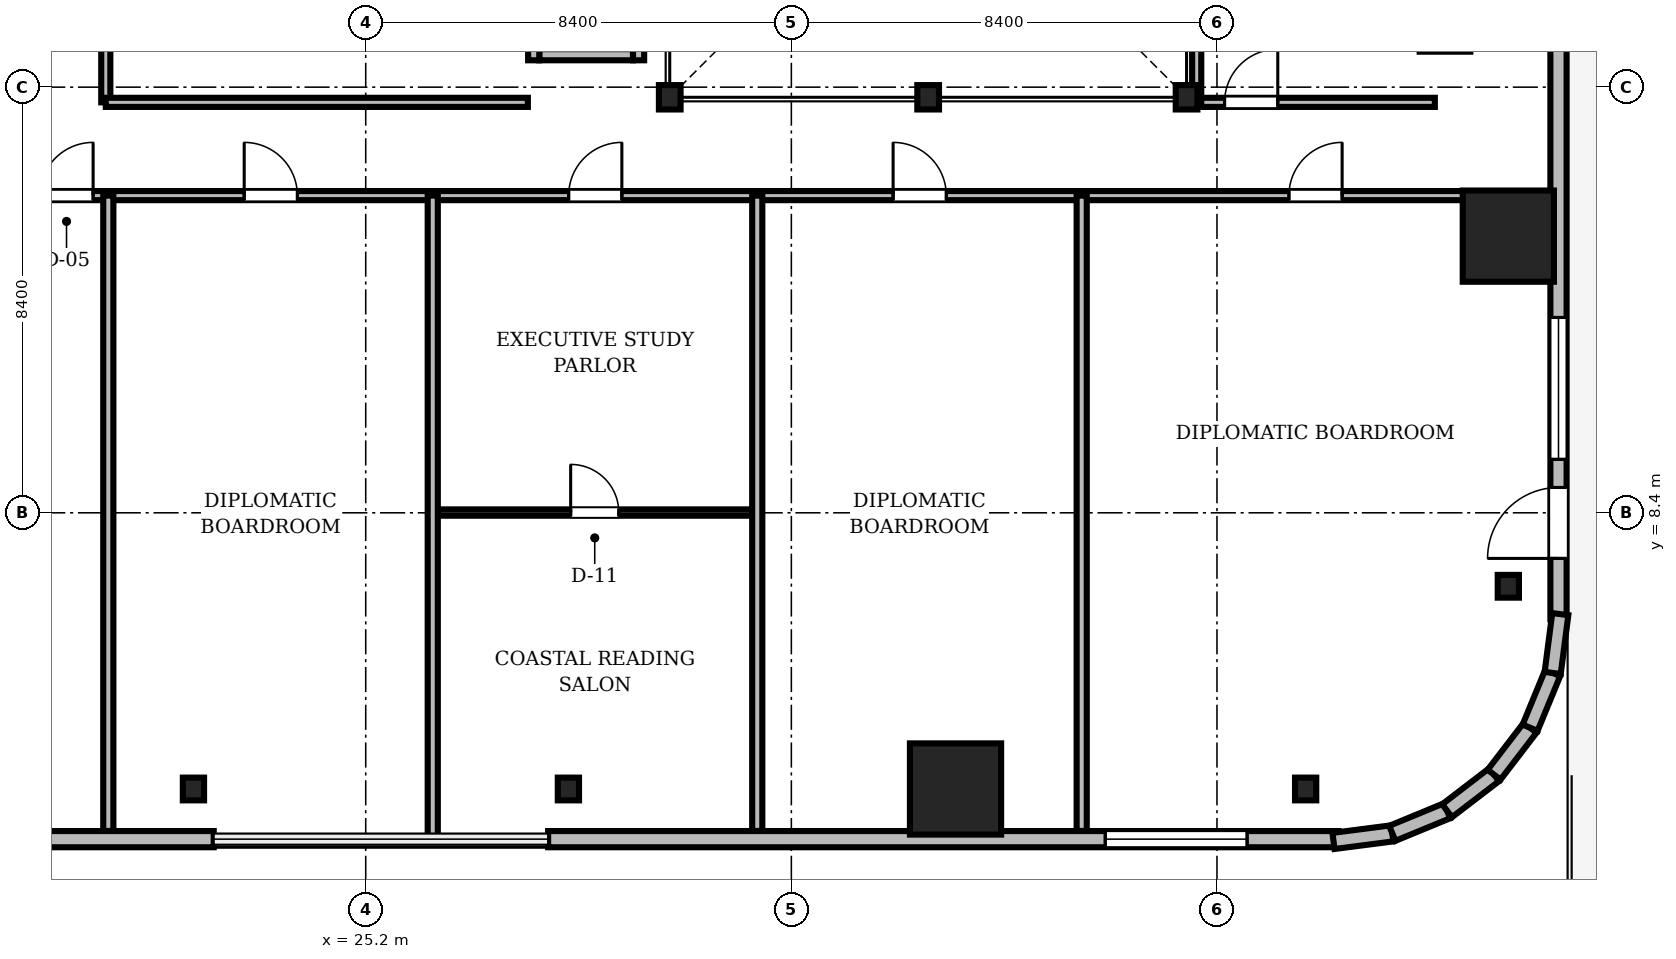
"""IFC4 building model, lengths in metres.
Left out: names, types, materials, properties, quantities, classifications, styles, units other than length and angle.
Written with IfcOpenShell. Run it as: python <this file> out.ifc"""

import sys

from ifc_helpers import new_model, si_unit, direction, frame, frame_2d, origin, origin_2d, place, context, subcontext, project, spatial, rectangle, i_section, extrude, source, transform, mapped, element, fill, save


model = new_model("IFC4")
c1 = context("Model", 3, precision=1e-05, world=origin(), true_north=direction((0.0, 1.0)))
c2 = subcontext(c1, "Body", "Model", "MODEL_VIEW")
j1 = project(units=[si_unit("LENGTHUNIT", "METRE"), si_unit("PLANEANGLEUNIT", "RADIAN")], contexts=[c1])
p1 = place(None, origin())
s1 = spatial("IfcSite", under=j1, at=p1, CompositionType="ELEMENT")
p2 = place(p1, origin())
s2 = spatial("IfcBuilding", under=s1, at=p2, CompositionType="ELEMENT")
p3 = place(p2, frame((0.0, 0.0, 27.6)))
s3 = spatial("IfcBuildingStorey", under=s2, at=p3, CompositionType="ELEMENT", Elevation=27.6)
m1 = source(origin(), c2, "Body", "SweptSolid", [
    extrude(i_section(OverallWidth=0.428, OverallDepth=0.481, WebThickness=0.04, FlangeThickness=0.063, FilletRadius=0.015, at=origin_2d()), origin(), (0.0, 0.0, 1.0), 3.41),
])
for number, where, z_axis, x_axis in (
    (1, (31.2, 16.6, 0.0), (0.0, 0.0, 1.0), (1.0, 0.0, 0.0)),
    (2, (36.3, 16.6, 0.0), (0.0, 0.0, 1.0), (1.0, 0.0, 0.0)),
    (3, (41.4, 16.6, 0.0), (0.0, 0.0, 1.0), (1.0, 0.0, 0.0)),
):
    element("IfcColumn", number, at=place(p3, frame(where, z_axis=z_axis, x_axis=x_axis)), inside=s3, PredefinedType="COLUMN", context=c2, shape_type="MappedRepresentation", body=[
        mapped(m1, transform((0.0, 0.0, 0.0), scale=1.0)),
    ])
m2 = source(origin(), c2, "Body", "SweptSolid", [
    extrude(rectangle(XDim=1.8, YDim=1.8, at=origin_2d()), origin(), (0.0, 0.0, 1.0), 3.41),
])
for number, where, z_axis, x_axis in (
    (4, (36.84, 2.95, 0.0), (0.0, 0.0, 1.0), (1.0, 0.0, 0.0)),
    (5, (47.75, 13.86, 0.0), (0.0, 0.0, 1.0), (1.0, 0.0, 0.0)),
):
    element("IfcColumn", number, at=place(p3, frame(where, z_axis=z_axis, x_axis=x_axis)), inside=s3, PredefinedType="COLUMN", context=c2, shape_type="MappedRepresentation", body=[
        mapped(m2, transform((0.0, 0.0, 0.0), scale=1.0)),
    ])
m3 = source(origin(), c2, "Body", "SweptSolid", [
    extrude(i_section(OverallWidth=0.419, OverallDepth=0.449, WebThickness=0.031, FlangeThickness=0.048, FilletRadius=0.015, at=origin_2d()), origin(), (0.0, 0.0, 1.0), 3.41),
])
for number, where, z_axis, x_axis in (
    (6, (21.8, 2.95, 0.0), (0.0, 0.0, 1.0), (1.0, 0.0, 0.0)),
    (7, (29.2, 2.95, 0.0), (0.0, 0.0, 1.0), (1.0, 0.0, 0.0)),
    (8, (43.75, 2.95, 0.0), (0.0, 0.0, 1.0), (1.0, 0.0, 0.0)),
    (9, (47.75, 6.95, 0.0), (0.0, 0.0, 1.0), (1.0, 0.0, 0.0)),
):
    element("IfcColumn", number, at=place(p3, frame(where, z_axis=z_axis, x_axis=x_axis)), inside=s3, PredefinedType="COLUMN", context=c2, shape_type="MappedRepresentation", body=[
        mapped(m3, transform((0.0, 0.0, 0.0), scale=1.0)),
    ])
m4 = source(origin(), c2, "Body", "SweptSolid", [
    extrude(rectangle(XDim=15.6, YDim=0.32, at=frame_2d((7.8, 0.0))), origin(), (0.0, 0.0, 1.0), 3.41),
])
p4 = place(p3, frame((6.6, 1.96, 0.0), z_axis=(0.0, 0.0, 1.0), x_axis=(1.0, 0.0, 0.0)))
e10 = element("IfcWall", 10, at=p4, inside=s3, PredefinedType="SOLIDWALL", context=c2, shape_type="MappedRepresentation", body=[
    mapped(m4, transform((0.0, 0.0, 0.0), scale=1.0)),
])
m5 = source(origin(), c2, "Body", "SweptSolid", [
    extrude(rectangle(XDim=1.4, YDim=2.3, at=frame_2d((0.7, 1.15))), frame((0.0, 0.17, 0.0), z_axis=(0.0, -1.0, 0.0), x_axis=(1.0, 0.0, 0.0)), (0.0, 0.0, 1.0), 0.34),
])
p5 = place(p4, frame((9.61, 0.0, 0.0)))
e11 = element("IfcOpeningElement", 11, at=p5, cuts=e10, PredefinedType="OPENING", context=c2, shape_type="MappedRepresentation", body=[
    mapped(m5, transform((0.0, 0.0, 0.0), scale=1.0)),
])
m6 = source(origin(), c2, "Body", "SweptSolid", [
    extrude(rectangle(XDim=2.8, YDim=2.4, at=frame_2d((1.4, 1.2))), frame((0.0, 0.17, 0.0), z_axis=(0.0, -1.0, 0.0), x_axis=(1.0, 0.0, 0.0)), (0.0, 0.0, 1.0), 0.34),
])
p6 = place(p4, frame((2.705, 0.0, 0.72)))
e12 = element("IfcOpeningElement", 12, at=p6, cuts=e10, PredefinedType="OPENING", context=c2, shape_type="MappedRepresentation", body=[
    mapped(m6, transform((0.0, 0.0, 0.0), scale=1.0)),
])
p7 = place(p3, frame((28.8, 1.96, 0.0), z_axis=(0.0, 0.0, 1.0), x_axis=(1.0, 0.0, 0.0)))
e13 = element("IfcWall", 13, at=p7, inside=s3, PredefinedType="SOLIDWALL", context=c2, shape_type="MappedRepresentation", body=[
    mapped(m4, transform((0.0, 0.0, 0.0), scale=1.0)),
])
p8 = place(p7, frame((10.995, 0.0, 0.72)))
e14 = element("IfcOpeningElement", 14, at=p8, cuts=e13, PredefinedType="OPENING", context=c2, shape_type="MappedRepresentation", body=[
    mapped(m6, transform((0.0, 0.0, 0.0), scale=1.0)),
])
p9 = place(p3, frame((48.74, 6.3, 0.0), z_axis=(0.0, 0.0, 1.0), x_axis=(0.0, 1.0, 0.0)))
e15 = element("IfcWall", 15, at=p9, inside=s3, PredefinedType="SOLIDWALL", context=c2, shape_type="MappedRepresentation", body=[
    mapped(m4, transform((0.0, 0.0, 0.0), scale=1.0)),
])
p10 = place(p9, frame((1.2, 0.0, 0.0)))
e16 = element("IfcOpeningElement", 16, at=p10, cuts=e15, PredefinedType="OPENING", context=c2, shape_type="MappedRepresentation", body=[
    mapped(m5, transform((0.0, 0.0, 0.0), scale=1.0)),
])
p11 = place(p9, frame((3.155, 0.0, 0.72)))
e17 = element("IfcOpeningElement", 17, at=p11, cuts=e15, PredefinedType="OPENING", context=c2, shape_type="MappedRepresentation", body=[
    mapped(m6, transform((0.0, 0.0, 0.0), scale=1.0)),
])
m7 = source(origin(), c2, "Body", "SweptSolid", [
    extrude(rectangle(XDim=1.17, YDim=0.32, at=frame_2d((0.585, 0.0))), origin(), (0.0, 0.0, 1.0), 3.41),
])
p12 = place(p3, frame((44.3, 1.925, 0.0), z_axis=(0.0, 0.0, 1.0), x_axis=(0.991762485493, 0.128090485085, 0.0)))
e18 = element("IfcWall", 18, at=p12, inside=s3, PredefinedType="SOLIDWALL", context=c2, shape_type="MappedRepresentation", body=[
    mapped(m7, transform((0.0, 0.0, 0.0), scale=1.0)),
])
m8 = source(origin(), c2, "Body", "SweptSolid", [
    extrude(rectangle(XDim=1.169, YDim=0.32, at=frame_2d((0.585, 0.0))), origin(), (0.0, 0.0, 1.0), 3.41),
])
p13 = place(p3, frame((45.46, 2.074, 0.0), z_axis=(0.0, 0.0, 1.0), x_axis=(0.924479075121, 0.381232789334, 0.0)))
e19 = element("IfcWall", 19, at=p13, inside=s3, PredefinedType="SOLIDWALL", context=c2, shape_type="MappedRepresentation", body=[
    mapped(m8, transform((0.0, 0.0, 0.0), scale=1.0)),
])
m9 = source(origin(), c2, "Body", "SweptSolid", [
    extrude(rectangle(XDim=1.169, YDim=0.32, at=frame_2d((0.584, 0.0))), origin(), (0.0, 0.0, 1.0), 3.41),
])
p14 = place(p3, frame((46.541, 2.52, 0.0), z_axis=(0.0, 0.0, 1.0), x_axis=(0.793663520347, 0.608356981114, 0.0)))
e20 = element("IfcWall", 20, at=p14, inside=s3, PredefinedType="SOLIDWALL", context=c2, shape_type="MappedRepresentation", body=[
    mapped(m9, transform((0.0, 0.0, 0.0), scale=1.0)),
])
m10 = source(origin(), c2, "Body", "SweptSolid", [
    extrude(rectangle(XDim=1.169, YDim=0.32, at=frame_2d((0.584, 0.0))), origin(), (0.0, 0.0, 1.0), 3.41),
])
for number, where, z_axis, x_axis in (
    (21, (47.469, 3.231, 0.0), (0.0, 0.0, 1.0), (0.608, 0.794, 0.0)),
    (22, (48.18, 4.159, 0.0), (0.0, 0.0, 1.0), (0.381, 0.925, 0.0)),
):
    element("IfcWall", number, at=place(p3, frame(where, z_axis=z_axis, x_axis=x_axis)), inside=s3, PredefinedType="SOLIDWALL", context=c2, shape_type="MappedRepresentation", body=[
        mapped(m10, transform((0.0, 0.0, 0.0), scale=1.0)),
    ])
m11 = source(origin(), c2, "Body", "SweptSolid", [
    extrude(rectangle(XDim=1.171, YDim=0.32, at=frame_2d((0.585, 0.0))), origin(), (0.0, 0.0, 1.0), 3.41),
])
p15 = place(p3, frame((48.625, 5.24, 0.0), z_axis=(0.0, 0.0, 1.0), x_axis=(0.128269133229, 0.991739395941, 0.0)))
e23 = element("IfcWall", 23, at=p15, inside=s3, PredefinedType="SOLIDWALL", context=c2, shape_type="MappedRepresentation", body=[
    mapped(m11, transform((0.0, 0.0, 0.0), scale=1.0)),
])
m12 = source(origin(), c2, "Body", "SweptSolid", [
    extrude(rectangle(XDim=1.85, YDim=0.22, at=frame_2d((0.925, 0.0))), origin(), (0.0, 0.0, 1.0), 3.41),
])
p16 = place(p3, frame((28.625, 17.44, 0.0), z_axis=(0.0, 0.0, 1.0), x_axis=(1.0, 0.0, 0.0)))
e24 = element("IfcWall", 24, at=p16, inside=s3, PredefinedType="SOLIDWALL", context=c2, shape_type="MappedRepresentation", body=[
    mapped(m12, transform((0.0, 0.0, 0.0), scale=1.0)),
])
m13 = source(origin(), c2, "Body", "SweptSolid", [
    extrude(rectangle(XDim=2.54, YDim=0.22, at=frame_2d((1.27, 0.0))), origin(), (0.0, 0.0, 1.0), 3.41),
])
for number, where, z_axis, x_axis in (
    (25, (28.515, 17.33, 0.0), (0.0, 0.0, 1.0), (0.0, 1.0, 0.0)),
    (26, (30.585, 17.33, 0.0), (0.0, 0.0, 1.0), (0.0, 1.0, 0.0)),
):
    element("IfcWall", number, at=place(p3, frame(where, z_axis=z_axis, x_axis=x_axis)), inside=s3, PredefinedType="SOLIDWALL", context=c2, shape_type="MappedRepresentation", body=[
        mapped(m13, transform((0.0, 0.0, 0.0), scale=1.0)),
    ])
m14 = source(origin(), c2, "Body", "SweptSolid", [
    extrude(rectangle(XDim=46.156, YDim=0.18, at=frame_2d((23.078, 0.0))), origin(), (0.0, 0.0, 1.0), 2.652),
])
p17 = place(p3, frame((2.422, 14.66, 0.0), z_axis=(0.0, 0.0, 1.0), x_axis=(1.0, 0.0, 0.0)))
e27 = element("IfcWall", 27, at=p17, inside=s3, PredefinedType="PARTITIONING", context=c2, shape_type="MappedRepresentation", body=[
    mapped(m14, transform((0.0, 0.0, 0.0), scale=1.0)),
])
m15 = source(origin(), c2, "Body", "SweptSolid", [
    extrude(rectangle(XDim=1.05, YDim=2.2, at=frame_2d((0.525, 1.1))), frame((0.0, 0.1, 0.0), z_axis=(0.0, -1.0, 0.0), x_axis=(1.0, 0.0, 0.0)), (0.0, 0.0, 1.0), 0.2),
])
p18 = place(p17, frame((16.348, 0.0, 0.0)))
e28 = element("IfcOpeningElement", 28, at=p18, cuts=e27, PredefinedType="OPENING", context=c2, shape_type="MappedRepresentation", body=[
    mapped(m15, transform((0.0, 0.0, 0.0), scale=1.0)),
])
p19 = place(p17, frame((20.38, 0.0, 0.0)))
e29 = element("IfcOpeningElement", 29, at=p19, cuts=e27, PredefinedType="OPENING", context=c2, shape_type="MappedRepresentation", body=[
    mapped(m15, transform((0.0, 0.0, 0.0), scale=1.0)),
])
p20 = place(p17, frame((26.783, 0.0, 0.0)))
e30 = element("IfcOpeningElement", 30, at=p20, cuts=e27, PredefinedType="OPENING", context=c2, shape_type="MappedRepresentation", body=[
    mapped(m15, transform((0.0, 0.0, 0.0), scale=1.0)),
])
p21 = place(p17, frame((33.186, 0.0, 0.0)))
e31 = element("IfcOpeningElement", 31, at=p21, cuts=e27, PredefinedType="OPENING", context=c2, shape_type="MappedRepresentation", body=[
    mapped(m15, transform((0.0, 0.0, 0.0), scale=1.0)),
])
p22 = place(p17, frame((40.998, 0.0, 0.0)))
e32 = element("IfcOpeningElement", 32, at=p22, cuts=e27, PredefinedType="OPENING", context=c2, shape_type="MappedRepresentation", body=[
    mapped(m15, transform((0.0, 0.0, 0.0), scale=1.0)),
])
m16 = source(origin(), c2, "Body", "SweptSolid", [
    extrude(rectangle(XDim=11.94, YDim=0.18, at=frame_2d((5.97, 0.0))), origin(), (0.0, 0.0, 1.0), 2.802),
])
p23 = place(p3, frame((20.07, 16.5, 0.0), z_axis=(0.0, 0.0, 1.0), x_axis=(0.0, 1.0, 0.0)))
e33 = element("IfcWall", 33, at=p23, inside=s3, PredefinedType="PARTITIONING", context=c2, shape_type="MappedRepresentation", body=[
    mapped(m16, transform((0.0, 0.0, 0.0), scale=1.0)),
])
p24 = place(p23, frame((4.5, 0.0, 0.0)))
e34 = element("IfcOpeningElement", 34, at=p24, cuts=e33, PredefinedType="OPENING", context=c2, shape_type="MappedRepresentation", body=[
    mapped(m15, transform((0.0, 0.0, 0.0), scale=1.0)),
])
m17 = source(origin(), c2, "Body", "SweptSolid", [
    extrude(rectangle(XDim=6.404, YDim=0.125, at=frame_2d((3.202, 0.0))), origin(), (0.0, 0.0, 1.0), 2.802),
])
p25 = place(p3, frame((26.523, 8.405, 0.0), z_axis=(0.0, 0.0, 1.0), x_axis=(1.0, 0.0, 0.0)))
e35 = element("IfcWall", 35, at=p25, inside=s3, PredefinedType="PARTITIONING", context=c2, shape_type="MappedRepresentation", body=[
    mapped(m17, transform((0.0, 0.0, 0.0), scale=1.0)),
])
m18 = source(origin(), c2, "Body", "SweptSolid", [
    extrude(rectangle(XDim=0.95, YDim=2.15, at=frame_2d((0.475, 1.075))), frame((0.0, 0.073, 0.0), z_axis=(0.0, -1.0, 0.0), x_axis=(1.0, 0.0, 0.0)), (0.0, 0.0, 1.0), 0.145),
])
p26 = place(p25, frame((2.722, 0.0, 0.0)))
e36 = element("IfcOpeningElement", 36, at=p26, cuts=e35, PredefinedType="OPENING", context=c2, shape_type="MappedRepresentation", body=[
    mapped(m18, transform((0.0, 0.0, 0.0), scale=1.0)),
])
m19 = source(origin(), c2, "Body", "SweptSolid", [
    extrude(rectangle(XDim=4.7, YDim=0.18, at=frame_2d((2.35, 0.0))), origin(), (0.0, 0.0, 1.0), 2.802),
])
p27 = place(p3, frame((41.6, 16.5, 0.0), z_axis=(0.0, 0.0, 1.0), x_axis=(1.0, 0.0, 0.0)))
e37 = element("IfcWall", 37, at=p27, inside=s3, PredefinedType="PARTITIONING", context=c2, shape_type="MappedRepresentation", body=[
    mapped(m19, transform((0.0, 0.0, 0.0), scale=1.0)),
])
p28 = place(p27, frame((0.55, 0.0, 0.0)))
e38 = element("IfcOpeningElement", 38, at=p28, cuts=e37, PredefinedType="OPENING", context=c2, shape_type="MappedRepresentation", body=[
    mapped(m15, transform((0.0, 0.0, 0.0), scale=1.0)),
])
m20 = source(origin(), c2, "Body", "SweptSolid", [
    extrude(rectangle(XDim=12.538, YDim=0.2, at=frame_2d((6.269, 0.0))), origin(), (0.0, 0.0, 1.0), 2.652),
])
p29 = place(p3, frame((20.12, 2.122, 0.0), z_axis=(0.0, 0.0, 1.0), x_axis=(0.0, 1.0, 0.0)))
e39 = element("IfcWall", 39, at=p29, inside=s3, PredefinedType="PARTITIONING", context=c2, shape_type="MappedRepresentation", body=[
    mapped(m20, transform((0.0, 0.0, 0.0), scale=1.0)),
])
m21 = source(origin(), c2, "Body", "SweptSolid", [
    extrude(rectangle(XDim=12.73, YDim=0.2, at=frame_2d((6.365, 0.0))), origin(), (0.0, 0.0, 1.0), 2.652),
])
p30 = place(p3, frame((26.523, 1.93, 0.0), z_axis=(0.0, 0.0, 1.0), x_axis=(0.0, 1.0, 0.0)))
e40 = element("IfcWall", 40, at=p30, inside=s3, PredefinedType="PARTITIONING", context=c2, shape_type="MappedRepresentation", body=[
    mapped(m21, transform((0.0, 0.0, 0.0), scale=1.0)),
])
for number, where, z_axis, x_axis in (
    (41, (32.927, 2.122, 0.0), (0.0, 0.0, 1.0), (0.0, 1.0, 0.0)),
    (42, (39.33, 2.122, 0.0), (0.0, 0.0, 1.0), (0.0, 1.0, 0.0)),
):
    element("IfcWall", number, at=place(p3, frame(where, z_axis=z_axis, x_axis=x_axis)), inside=s3, PredefinedType="PARTITIONING", context=c2, shape_type="MappedRepresentation", body=[
        mapped(m20, transform((0.0, 0.0, 0.0), scale=1.0)),
    ])
m22 = source(origin(), c2, "Body", "SweptSolid", [
    extrude(rectangle(XDim=8.33, YDim=0.18, at=frame_2d((4.165, 0.0))), origin(), (0.0, 0.0, 1.0), 2.802),
])
p31 = place(p3, frame((20.07, 16.5, 0.0), z_axis=(0.0, 0.0, 1.0), x_axis=(1.0, 0.0, 0.0)))
e43 = element("IfcWall", 43, at=p31, inside=s3, PredefinedType="PARTITIONING", context=c2, shape_type="MappedRepresentation", body=[
    mapped(m22, transform((0.0, 0.0, 0.0), scale=1.0)),
])
m23 = source(origin(), c2, "Body", "SweptSolid", [
    extrude(rectangle(XDim=7.15, YDim=0.18, at=frame_2d((3.575, 0.0))), origin(), (0.0, 0.0, 1.0), 2.802),
])
p32 = place(p3, frame((41.6, 16.5, 0.0), z_axis=(0.0, 0.0, 1.0), x_axis=(0.0, 1.0, 0.0)))
e44 = element("IfcWall", 44, at=p32, inside=s3, PredefinedType="PARTITIONING", context=c2, shape_type="MappedRepresentation", body=[
    mapped(m23, transform((0.0, 0.0, 0.0), scale=1.0)),
])
m24 = source(origin(), c2, "Body", "SweptSolid", [
    extrude(rectangle(XDim=2.8, YDim=2.4, at=frame_2d((1.4, 1.2))), frame((0.0, 0.03, 0.0), z_axis=(0.0, -1.0, 0.0), x_axis=(1.0, 0.0, 0.0)), (0.0, 0.0, 1.0), 0.06),
])
p33 = place(p8, origin())
e45 = element("IfcWindow", 45, at=p33, inside=s3, PartitioningType="SINGLE_PANEL", PredefinedType="WINDOW", context=c2, shape_type="MappedRepresentation", body=[
    mapped(m24, transform((0.0, 0.0, 0.0), scale=1.0)),
])
fill(e14, e45)
m25 = source(origin(), c2, "Body", "SweptSolid", [
    extrude(rectangle(XDim=1.4, YDim=2.3, at=frame_2d((0.7, 1.15))), frame((0.0, 0.025, 0.0), z_axis=(0.0, -1.0, 0.0), x_axis=(1.0, 0.0, 0.0)), (0.0, 0.0, 1.0), 0.05),
])
p34 = place(p10, frame((1.4, 0.0, 0.0), z_axis=(0.0, 0.0, 1.0), x_axis=(-1.0, 0.0, 0.0)))
e46 = element("IfcDoor", 46, at=p34, inside=s3, OperationType="DOUBLE_DOOR_SLIDING", PredefinedType="DOOR", context=c2, shape_type="MappedRepresentation", body=[
    mapped(m25, transform((0.0, 0.0, 0.0), scale=1.0)),
])
fill(e16, e46)
p35 = place(p11, origin())
e47 = element("IfcWindow", 47, at=p35, inside=s3, PartitioningType="SINGLE_PANEL", PredefinedType="WINDOW", context=c2, shape_type="MappedRepresentation", body=[
    mapped(m24, transform((0.0, 0.0, 0.0), scale=1.0)),
])
fill(e17, e47)
m26 = source(origin(), c2, "Body", "SweptSolid", [
    extrude(rectangle(XDim=1.05, YDim=2.2, at=frame_2d((0.525, 1.1))), frame((0.0, 0.025, 0.0), z_axis=(0.0, -1.0, 0.0), x_axis=(1.0, 0.0, 0.0)), (0.0, 0.0, 1.0), 0.05),
])
p36 = place(p18, origin())
e48 = element("IfcDoor", 48, at=p36, inside=s3, OperationType="SINGLE_SWING_RIGHT", PredefinedType="DOOR", context=c2, shape_type="MappedRepresentation", body=[
    mapped(m26, transform((0.0, 0.0, 0.0), scale=1.0)),
])
fill(e28, e48)
p37 = place(p19, origin())
e49 = element("IfcDoor", 49, at=p37, inside=s3, OperationType="SINGLE_SWING_LEFT", PredefinedType="DOOR", context=c2, shape_type="MappedRepresentation", body=[
    mapped(m26, transform((0.0, 0.0, 0.0), scale=1.0)),
])
fill(e29, e49)
p38 = place(p20, origin())
e50 = element("IfcDoor", 50, at=p38, inside=s3, OperationType="SINGLE_SWING_RIGHT", PredefinedType="DOOR", context=c2, shape_type="MappedRepresentation", body=[
    mapped(m26, transform((0.0, 0.0, 0.0), scale=1.0)),
])
fill(e30, e50)
p39 = place(p21, origin())
e51 = element("IfcDoor", 51, at=p39, inside=s3, OperationType="SINGLE_SWING_LEFT", PredefinedType="DOOR", context=c2, shape_type="MappedRepresentation", body=[
    mapped(m26, transform((0.0, 0.0, 0.0), scale=1.0)),
])
fill(e31, e51)
p40 = place(p22, origin())
e52 = element("IfcDoor", 52, at=p40, inside=s3, OperationType="SINGLE_SWING_RIGHT", PredefinedType="DOOR", context=c2, shape_type="MappedRepresentation", body=[
    mapped(m26, transform((0.0, 0.0, 0.0), scale=1.0)),
])
fill(e32, e52)
m27 = source(origin(), c2, "Body", "SweptSolid", [
    extrude(rectangle(XDim=0.95, YDim=2.15, at=frame_2d((0.475, 1.075))), frame((0.0, 0.025, 0.0), z_axis=(0.0, -1.0, 0.0), x_axis=(1.0, 0.0, 0.0)), (0.0, 0.0, 1.0), 0.05),
])
p41 = place(p26, origin())
e53 = element("IfcDoor", 53, at=p41, inside=s3, OperationType="SINGLE_SWING_LEFT", PredefinedType="DOOR", context=c2, shape_type="MappedRepresentation", body=[
    mapped(m27, transform((0.0, 0.0, 0.0), scale=1.0)),
])
fill(e36, e53)
p42 = place(p28, origin())
e54 = element("IfcDoor", 54, at=p42, inside=s3, OperationType="SINGLE_SWING_RIGHT", PredefinedType="DOOR", context=c2, shape_type="MappedRepresentation", body=[
    mapped(m26, transform((0.0, 0.0, 0.0), scale=1.0)),
])
fill(e38, e54)
save(model, sys.argv[1])
